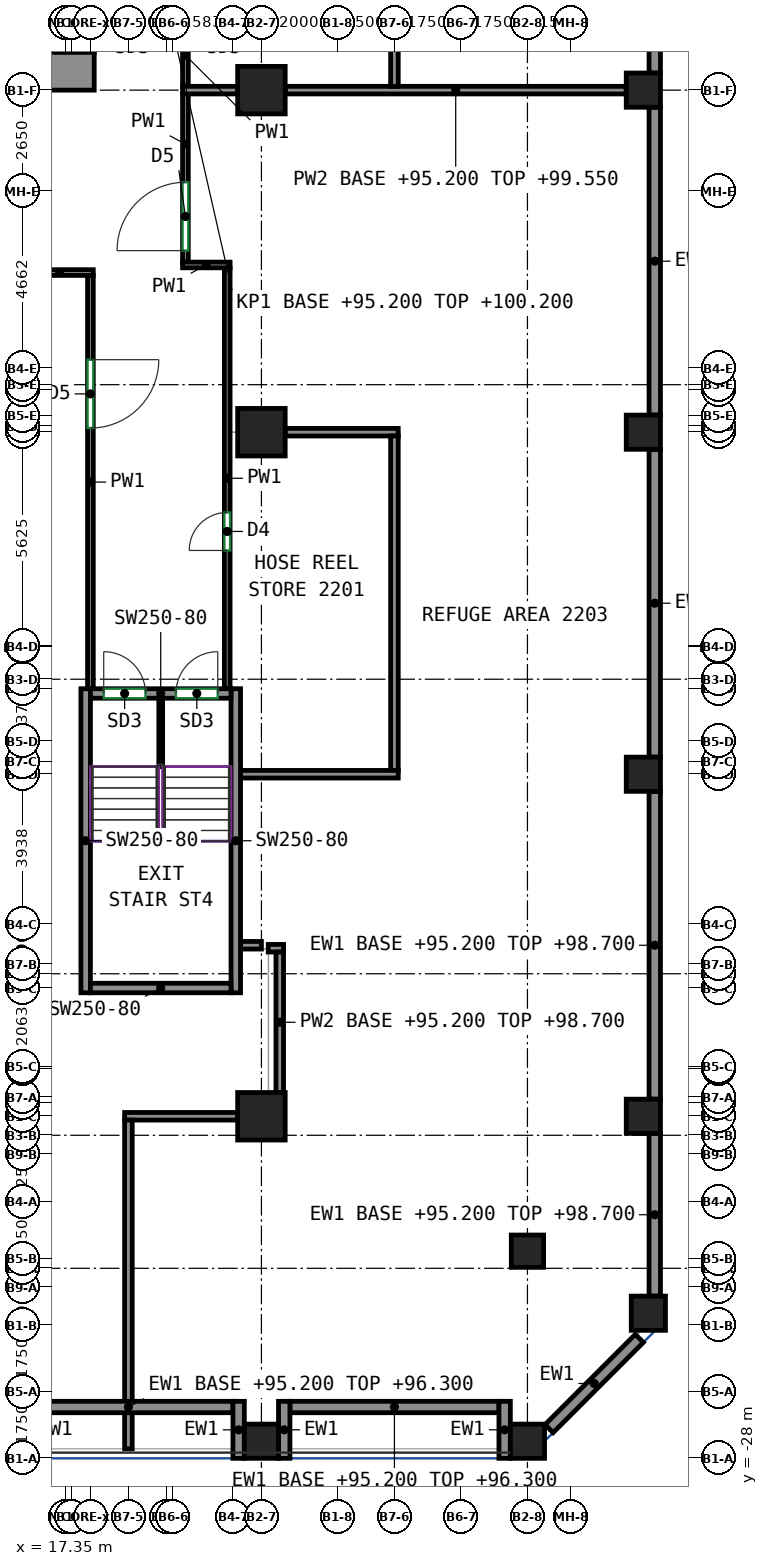
"""IFC4 building model, lengths in metres.
Left out: names, types, materials, properties, quantities, classifications, styles, units other than length and angle.
Written with IfcOpenShell. Run it as: python <this file> out.ifc"""

import sys

from ifc_helpers import new_model, si_unit, direction, frame, frame_2d, origin, origin_2d, place, context, subcontext, project, spatial, rectangle, extrude, source, transform, mapped, element, fill, save


model = new_model("IFC4")
c1 = context("Model", 3, precision=1e-05, world=origin(), true_north=direction((0.0, 1.0)))
c2 = subcontext(c1, "Body", "Model", "MODEL_VIEW")
j1 = project(units=[si_unit("LENGTHUNIT", "METRE"), si_unit("PLANEANGLEUNIT", "RADIAN")], contexts=[c1])
p1 = place(None, origin())
s1 = spatial("IfcSite", under=j1, at=p1, CompositionType="ELEMENT")
p2 = place(p1, origin())
s2 = spatial("IfcBuilding", under=s1, at=p2, CompositionType="ELEMENT")
p3 = place(p2, frame((0.0, 0.0, 95.2)))
s3 = spatial("IfcBuildingStorey", under=s2, at=p3, CompositionType="ELEMENT", Elevation=95.2)
m1 = source(origin(), c2, "Body", "SweptSolid", [
    extrude(rectangle(XDim=0.9, YDim=0.9, at=origin_2d()), origin(), (0.0, 0.0, 1.0), 3.5),
])
p4 = place(p3, frame((22.5, -27.55, 0.0), z_axis=(0.0, 0.0, 1.0), x_axis=(1.0, 0.0, 0.0)))
e1 = element("IfcColumn", 1, at=p4, inside=s3, PredefinedType="COLUMN", context=c2, shape_type="MappedRepresentation", body=[
    mapped(m1, transform((0.0, 0.0, 0.0))),
])
m2 = source(origin(), c2, "Body", "SweptSolid", [
    extrude(rectangle(XDim=1.25, YDim=1.25, at=origin_2d()), origin(), (0.0, 0.0, 1.0), 3.5),
])
for number, where, z_axis, x_axis in (
    (2, (22.5, -19.0, 0.0), (0.0, 0.0, 1.0), (1.0, 0.0, 0.0)),
    (3, (22.5, -1.0, 0.0), (0.0, 0.0, 1.0), (1.0, 0.0, 0.0)),
    (4, (22.5, 8.0, 0.0), (0.0, 0.0, 1.0), (1.0, 0.0, 0.0)),
):
    element("IfcColumn", number, at=place(p3, frame(where, z_axis=z_axis, x_axis=x_axis)), inside=s3, PredefinedType="COLUMN", context=c2, shape_type="MappedRepresentation", body=[
        mapped(m2, transform((0.0, 0.0, 0.0))),
    ])
m3 = source(origin(), c2, "Body", "SweptSolid", [
    extrude(rectangle(XDim=0.9, YDim=0.9, at=origin_2d()), origin(), (0.0, 0.0, 1.0), 5.0),
])
p5 = place(p3, frame((29.5, -27.55, 0.0), z_axis=(0.0, 0.0, 1.0), x_axis=(1.0, 0.0, 0.0)))
e5 = element("IfcColumn", 5, at=p5, inside=s3, PredefinedType="COLUMN", context=c2, shape_type="MappedRepresentation", body=[
    mapped(m3, transform((0.0, 0.0, 0.0))),
])
for number, where, z_axis, x_axis in (
    (6, (32.55, -19.0, 0.0), (0.0, 0.0, 1.0), (1.0, 0.0, 0.0)),
    (7, (32.55, -10.0, 0.0), (0.0, 0.0, 1.0), (1.0, 0.0, 0.0)),
    (8, (32.55, -1.0, 0.0), (0.0, 0.0, 1.0), (1.0, 0.0, 0.0)),
    (9, (32.55, 8.0, 0.0), (0.0, 0.0, 1.0), (1.0, 0.0, 0.0)),
    (10, (32.682, -24.182, 0.0), (0.0, 0.0, 1.0), (1.0, 0.0, 0.0)),
):
    element("IfcColumn", number, at=place(p3, frame(where, z_axis=z_axis, x_axis=x_axis)), inside=s3, PredefinedType="COLUMN", context=c2, shape_type="MappedRepresentation", body=[
        mapped(m1, transform((0.0, 0.0, 0.0))),
    ])
m4 = source(origin(), c2, "Body", "SweptSolid", [
    extrude(rectangle(XDim=0.85, YDim=0.85, at=origin_2d()), origin(), (0.0, 0.0, 1.0), 5.0),
])
p6 = place(p3, frame((29.5, -22.55, 0.0), z_axis=(0.0, 0.0, 1.0), x_axis=(1.0, 0.0, 0.0)))
e11 = element("IfcColumn", 11, at=p6, inside=s3, PredefinedType="COLUMN", context=c2, shape_type="MappedRepresentation", body=[
    mapped(m4, transform((0.0, 0.0, 0.0))),
])
m5 = source(origin(), c2, "Body", "SweptSolid", [
    extrude(rectangle(XDim=5.63, YDim=1.0, at=frame_2d((2.815, 0.0))), origin(), (0.0, 0.0, 1.0), 5.0),
])
p7 = place(p3, frame((12.47, 8.5, 0.0), z_axis=(0.0, 0.0, 1.0), x_axis=(1.0, 0.0, 0.0)))
e12 = element("IfcWall", 12, at=p7, inside=s3, PredefinedType="SHEAR", context=c2, shape_type="MappedRepresentation", body=[
    mapped(m5, transform((0.0, 0.0, 0.0))),
])
p8 = place(p7, frame((1.28, 0.0, 0.0)))
e13 = element("IfcOpeningElement", 13, at=p8, cuts=e12, PredefinedType="OPENING", context=c2, shape_type="SweptSolid", body=[
    extrude(rectangle(XDim=1.1, YDim=2.1, at=frame_2d((0.55, 1.05))), frame((0.0, 0.51, 0.0), z_axis=(0.0, -1.0, 0.0), x_axis=(1.0, 0.0, 0.0)), (0.0, 0.0, 1.0), 1.02),
])
p9 = place(p7, frame((3.18, 0.0, 0.0)))
e14 = element("IfcOpeningElement", 14, at=p9, cuts=e12, PredefinedType="OPENING", context=c2, shape_type="SweptSolid", body=[
    extrude(rectangle(XDim=1.1, YDim=2.1, at=frame_2d((0.55, 1.05))), frame((0.0, 0.51, 0.0), z_axis=(0.0, -1.0, 0.0), x_axis=(1.0, 0.0, 0.0)), (0.0, 0.0, 1.0), 1.02),
])
m6 = source(origin(), c2, "Body", "SweptSolid", [
    extrude(rectangle(XDim=8.0, YDim=0.25, at=frame_2d((4.0, 0.0))), origin(), (0.0, 0.0, 1.0), 5.0),
])
for number, where, z_axis, x_axis in (
    (15, (17.875, -15.75, 0.0), (0.0, 0.0, 1.0), (0.0, 1.0, 0.0)),
    (16, (21.825, -15.75, 0.0), (0.0, 0.0, 1.0), (0.0, 1.0, 0.0)),
):
    element("IfcWall", number, at=place(p3, frame(where, z_axis=z_axis, x_axis=x_axis)), inside=s3, PredefinedType="SHEAR", context=c2, shape_type="MappedRepresentation", body=[
        mapped(m6, transform((0.0, 0.0, 0.0))),
    ])
m7 = source(origin(), c2, "Body", "SweptSolid", [
    extrude(rectangle(XDim=3.7, YDim=0.25, at=frame_2d((1.85, 0.0))), origin(), (0.0, 0.0, 1.0), 5.0),
])
p10 = place(p3, frame((18.0, -15.625, 0.0), z_axis=(0.0, 0.0, 1.0), x_axis=(1.0, 0.0, 0.0)))
e17 = element("IfcWall", 17, at=p10, inside=s3, PredefinedType="SHEAR", context=c2, shape_type="MappedRepresentation", body=[
    mapped(m7, transform((0.0, 0.0, 0.0))),
])
p11 = place(p3, frame((18.0, -7.875, 0.0), z_axis=(0.0, 0.0, 1.0), x_axis=(1.0, 0.0, 0.0)))
e18 = element("IfcWall", 18, at=p11, inside=s3, PredefinedType="SHEAR", context=c2, shape_type="MappedRepresentation", body=[
    mapped(m7, transform((0.0, 0.0, 0.0))),
])
p12 = place(p11, frame((2.25, 0.0, 0.0)))
e19 = element("IfcOpeningElement", 19, at=p12, cuts=e18, PredefinedType="OPENING", context=c2, shape_type="SweptSolid", body=[
    extrude(rectangle(XDim=1.1, YDim=2.1, at=frame_2d((0.55, 1.05))), frame((0.0, 0.135, 0.0), z_axis=(0.0, -1.0, 0.0), x_axis=(1.0, 0.0, 0.0)), (0.0, 0.0, 1.0), 0.27),
])
p13 = place(p11, frame((0.35, 0.0, 0.0)))
e20 = element("IfcOpeningElement", 20, at=p13, cuts=e18, PredefinedType="OPENING", context=c2, shape_type="SweptSolid", body=[
    extrude(rectangle(XDim=1.1, YDim=2.1, at=frame_2d((0.55, 1.05))), frame((0.0, 0.135, 0.0), z_axis=(0.0, -1.0, 0.0), x_axis=(1.0, 0.0, 0.0)), (0.0, 0.0, 1.0), 0.27),
])
m8 = source(origin(), c2, "Body", "SweptSolid", [
    extrude(rectangle(XDim=5.5, YDim=0.3, at=frame_2d((2.75, 0.0))), origin(), (0.0, 0.0, 1.0), 1.1),
])
p14 = place(p3, frame((16.25, -26.65, 0.0), z_axis=(0.0, 0.0, 1.0), x_axis=(1.0, 0.0, 0.0)))
e21 = element("IfcWall", 21, at=p14, inside=s3, PredefinedType="SOLIDWALL", context=c2, shape_type="MappedRepresentation", body=[
    mapped(m8, transform((0.0, 0.0, 0.0))),
])
m9 = source(origin(), c2, "Body", "SweptSolid", [
    extrude(rectangle(XDim=1.5, YDim=0.3, at=frame_2d((0.75, 0.0))), origin(), (0.0, 0.0, 1.0), 5.0),
])
p15 = place(p3, frame((21.9, -28.0, 0.0), z_axis=(0.0, 0.0, 1.0), x_axis=(0.0, 1.0, 0.0)))
e22 = element("IfcWall", 22, at=p15, inside=s3, PredefinedType="SOLIDWALL", context=c2, shape_type="MappedRepresentation", body=[
    mapped(m9, transform((0.0, 0.0, 0.0))),
])
p16 = place(p3, frame((23.25, -26.65, 0.0), z_axis=(0.0, 0.0, 1.0), x_axis=(1.0, 0.0, 0.0)))
e23 = element("IfcWall", 23, at=p16, inside=s3, PredefinedType="SOLIDWALL", context=c2, shape_type="MappedRepresentation", body=[
    mapped(m8, transform((0.0, 0.0, 0.0))),
])
for number, where, z_axis, x_axis in (
    (24, (23.1, -28.0, 0.0), (0.0, 0.0, 1.0), (0.0, 1.0, 0.0)),
    (25, (28.9, -28.0, 0.0), (0.0, 0.0, 1.0), (0.0, 1.0, 0.0)),
):
    element("IfcWall", number, at=place(p3, frame(where, z_axis=z_axis, x_axis=x_axis)), inside=s3, PredefinedType="SOLIDWALL", context=c2, shape_type="MappedRepresentation", body=[
        mapped(m9, transform((0.0, 0.0, 0.0))),
    ])
m10 = source(origin(), c2, "Body", "SweptSolid", [
    extrude(rectangle(XDim=3.359, YDim=0.3, at=frame_2d((1.679, 0.0))), origin(), (0.0, 0.0, 1.0), 5.0),
])
p17 = place(p3, frame((30.069, -27.219, 0.0), z_axis=(0.0, 0.0, 1.0), x_axis=(0.707143122278, 0.707070438228, 0.0)))
e26 = element("IfcWall", 26, at=p17, inside=s3, PredefinedType="SOLIDWALL", context=c2, shape_type="MappedRepresentation", body=[
    mapped(m10, transform((0.0, 0.0, 0.0))),
])
m11 = source(origin(), c2, "Body", "SweptSolid", [
    extrude(rectangle(XDim=4.282, YDim=0.3, at=frame_2d((2.141, 0.0))), origin(), (0.0, 0.0, 1.0), 3.5),
])
p18 = place(p3, frame((32.85, -23.732, 0.0), z_axis=(0.0, 0.0, 1.0), x_axis=(0.0, 1.0, 0.0)))
e27 = element("IfcWall", 27, at=p18, inside=s3, PredefinedType="SOLIDWALL", context=c2, shape_type="MappedRepresentation", body=[
    mapped(m11, transform((0.0, 0.0, 0.0))),
])
m12 = source(origin(), c2, "Body", "SweptSolid", [
    extrude(rectangle(XDim=8.1, YDim=0.3, at=frame_2d((4.05, 0.0))), origin(), (0.0, 0.0, 1.0), 3.5),
])
for number, where, z_axis, x_axis in (
    (28, (32.85, -18.55, 0.0), (0.0, 0.0, 1.0), (0.0, 1.0, 0.0)),
    (29, (32.85, -9.55, 0.0), (0.0, 0.0, 1.0), (0.0, 1.0, 0.0)),
    (30, (32.85, -0.55, 0.0), (0.0, 0.0, 1.0), (0.0, 1.0, 0.0)),
):
    element("IfcWall", number, at=place(p3, frame(where, z_axis=z_axis, x_axis=x_axis)), inside=s3, PredefinedType="SOLIDWALL", context=c2, shape_type="MappedRepresentation", body=[
        mapped(m12, transform((0.0, 0.0, 0.0))),
    ])
m13 = source(origin(), c2, "Body", "SweptSolid", [
    extrude(rectangle(XDim=15.6, YDim=0.3, at=frame_2d((7.8, 0.0))), origin(), (0.0, 0.0, 1.0), 3.5),
])
p19 = place(p3, frame((32.85, 8.45, 0.0), z_axis=(0.0, 0.0, 1.0), x_axis=(0.0, 1.0, 0.0)))
e31 = element("IfcWall", 31, at=p19, inside=s3, PredefinedType="SOLIDWALL", context=c2, shape_type="MappedRepresentation", body=[
    mapped(m13, transform((0.0, 0.0, 0.0))),
])
m14 = source(origin(), c2, "Body", "SweptSolid", [
    extrude(rectangle(XDim=1.8, YDim=0.1, at=frame_2d((0.9, 0.0))), origin(), (0.0, 0.0, 1.0), 2.5),
])
p20 = place(p3, frame((19.85, -9.8, 0.0), z_axis=(0.0, 0.0, 1.0), x_axis=(0.0, 1.0, 0.0)))
e32 = element("IfcWall", 32, at=p20, inside=s3, PredefinedType="PARTITIONING", context=c2, shape_type="MappedRepresentation", body=[
    mapped(m14, transform((0.0, 0.0, 0.0))),
])
p21 = place(p3, frame((18.0, 3.125, 0.0), z_axis=(0.0, 0.0, 1.0), x_axis=(0.0, -1.0, 0.0)))
e33 = element("IfcWall", 33, at=p21, inside=s3, PredefinedType="PARTITIONING", context=c2, shape_type="SweptSolid", body=[
    extrude(rectangle(XDim=10.875, YDim=0.15, at=frame_2d((5.438, 0.0))), origin(), (0.0, 0.0, 1.0), 5.0),
])
p22 = place(p21, frame((2.217, 0.0, 0.0)))
e34 = element("IfcOpeningElement", 34, at=p22, cuts=e33, PredefinedType="OPENING", context=c2, shape_type="SweptSolid", body=[
    extrude(rectangle(XDim=1.8, YDim=2.1, at=frame_2d((0.9, 1.05))), frame((0.0, 0.085, 0.0), z_axis=(0.0, -1.0, 0.0), x_axis=(1.0, 0.0, 0.0)), (0.0, 0.0, 1.0), 0.17),
])
p23 = place(p3, frame((16.305, 3.2, 0.0), z_axis=(0.0, 0.0, 1.0), x_axis=(1.0, 0.0, 0.0)))
e35 = element("IfcWall", 35, at=p23, inside=s3, PredefinedType="PARTITIONING", context=c2, shape_type="SweptSolid", body=[
    extrude(rectangle(XDim=1.77, YDim=0.15, at=frame_2d((0.885, 0.0))), origin(), (0.0, 0.0, 1.0), 5.0),
])
p24 = place(p3, frame((21.6, -7.75, 0.0), z_axis=(0.0, 0.0, 1.0), x_axis=(0.0, 1.0, 0.0)))
e36 = element("IfcWall", 36, at=p24, inside=s3, PredefinedType="PARTITIONING", context=c2, shape_type="SweptSolid", body=[
    extrude(rectangle(XDim=11.075, YDim=0.15, at=frame_2d((5.538, 0.0))), origin(), (0.0, 0.0, 1.0), 5.0),
])
p25 = place(p24, frame((3.638, 0.0, 0.0)))
e37 = element("IfcOpeningElement", 37, at=p25, cuts=e36, PredefinedType="OPENING", context=c2, shape_type="SweptSolid", body=[
    extrude(rectangle(XDim=1.0, YDim=2.1, at=frame_2d((0.5, 1.05))), frame((0.0, 0.085, 0.0), z_axis=(0.0, -1.0, 0.0), x_axis=(1.0, 0.0, 0.0)), (0.0, 0.0, 1.0), 0.17),
])
p26 = place(p3, frame((20.5, 3.475, 0.0), z_axis=(0.0, 0.0, 1.0), x_axis=(0.0, 1.0, 0.0)))
e38 = element("IfcWall", 38, at=p26, inside=s3, PredefinedType="PARTITIONING", context=c2, shape_type="SweptSolid", body=[
    extrude(rectangle(XDim=4.435, YDim=0.15, at=frame_2d((2.217, 0.0))), origin(), (0.0, 0.0, 1.0), 5.0),
])
p27 = place(p26, frame((0.302, 0.0, 0.0)))
e39 = element("IfcOpeningElement", 39, at=p27, cuts=e38, PredefinedType="OPENING", context=c2, shape_type="SweptSolid", body=[
    extrude(rectangle(XDim=1.8, YDim=2.1, at=frame_2d((0.9, 1.05))), frame((0.0, 0.085, 0.0), z_axis=(0.0, -1.0, 0.0), x_axis=(1.0, 0.0, 0.0)), (0.0, 0.0, 1.0), 0.17),
])
p28 = place(p3, frame((21.675, 3.4, 0.0), z_axis=(0.0, 0.0, 1.0), x_axis=(-1.0, 0.0, 0.0)))
e40 = element("IfcWall", 40, at=p28, inside=s3, PredefinedType="PARTITIONING", context=c2, shape_type="SweptSolid", body=[
    extrude(rectangle(XDim=1.25, YDim=0.15, at=frame_2d((0.625, 0.0))), origin(), (0.0, 0.0, 1.0), 5.0),
])
p29 = place(p3, frame((20.5, 8.09, 0.0), z_axis=(0.0, 0.0, 1.0), x_axis=(0.0, 1.0, 0.0)))
e41 = element("IfcWall", 41, at=p29, inside=s3, PredefinedType="PARTITIONING", context=c2, shape_type="SweptSolid", body=[
    extrude(rectangle(XDim=1.66, YDim=0.15, at=frame_2d((0.83, 0.0))), origin(), (0.0, 0.0, 1.0), 5.0),
])
p30 = place(p3, frame((22.5, -14.5, 0.0), z_axis=(0.0, 0.0, 1.0), x_axis=(-1.0, 0.0, 0.0)))
e42 = element("IfcWall", 42, at=p30, inside=s3, PredefinedType="PARTITIONING", context=c2, shape_type="SweptSolid", body=[
    extrude(rectangle(XDim=0.55, YDim=0.2, at=frame_2d((0.275, 0.0))), origin(), (0.0, 0.0, 1.0), 5.0),
])
p31 = place(p3, frame((23.082, -14.578, 0.0), z_axis=(0.0, 0.0, 1.0), x_axis=(-1.0, 0.0, 0.0)))
e43 = element("IfcWall", 43, at=p31, inside=s3, PredefinedType="PARTITIONING", context=c2, shape_type="SweptSolid", body=[
    extrude(rectangle(XDim=0.402, YDim=0.2, at=frame_2d((0.201, 0.0))), origin(), (0.0, 0.0, 1.0), 5.0),
])
p32 = place(p3, frame((22.982, -18.375, 0.0), z_axis=(0.0, 0.0, 1.0), x_axis=(0.0, 1.0, 0.0)))
e44 = element("IfcWall", 44, at=p32, inside=s3, PredefinedType="PARTITIONING", context=c2, shape_type="SweptSolid", body=[
    extrude(rectangle(XDim=3.697, YDim=0.2, at=frame_2d((1.849, 0.0))), origin(), (0.0, 0.0, 1.0), 3.5),
])
p33 = place(p3, frame((18.9, -19.0, 0.0), z_axis=(0.0, 0.0, 1.0), x_axis=(1.0, 0.0, 0.0)))
e45 = element("IfcWall", 45, at=p33, inside=s3, PredefinedType="PARTITIONING", context=c2, shape_type="SweptSolid", body=[
    extrude(rectangle(XDim=2.975, YDim=0.2, at=frame_2d((1.488, 0.0))), origin(), (0.0, 0.0, 1.0), 5.0),
])
p34 = place(p3, frame((19.0, -27.75, 0.0), z_axis=(0.0, 0.0, 1.0), x_axis=(0.0, 1.0, 0.0)))
e46 = element("IfcWall", 46, at=p34, inside=s3, PredefinedType="PARTITIONING", context=c2, shape_type="SweptSolid", body=[
    extrude(rectangle(XDim=0.98, YDim=0.2, at=frame_2d((0.49, 0.0))), origin(), (0.0, 0.0, 1.0), 5.0),
])
p35 = place(p3, frame((19.0, -26.53, 0.0), z_axis=(0.0, 0.0, 1.0), x_axis=(0.0, 1.0, 0.0)))
e47 = element("IfcWall", 47, at=p35, inside=s3, PredefinedType="PARTITIONING", context=c2, shape_type="SweptSolid", body=[
    extrude(rectangle(XDim=7.43, YDim=0.2, at=frame_2d((3.715, 0.0))), origin(), (0.0, 0.0, 1.0), 5.0),
])
p36 = place(p3, frame((23.125, -1.0, 0.0), z_axis=(0.0, 0.0, 1.0), x_axis=(1.0, 0.0, 0.0)))
e48 = element("IfcWall", 48, at=p36, inside=s3, PredefinedType="PARTITIONING", context=c2, shape_type="SweptSolid", body=[
    extrude(rectangle(XDim=2.975, YDim=0.2, at=frame_2d((1.488, 0.0))), origin(), (0.0, 0.0, 1.0), 5.0),
])
p37 = place(p3, frame((26.0, -9.9, 0.0), z_axis=(0.0, 0.0, 1.0), x_axis=(0.0, 1.0, 0.0)))
e49 = element("IfcWall", 49, at=p37, inside=s3, PredefinedType="PARTITIONING", context=c2, shape_type="SweptSolid", body=[
    extrude(rectangle(XDim=8.8, YDim=0.2, at=frame_2d((4.4, 0.0))), origin(), (0.0, 0.0, 1.0), 5.0),
])
p38 = place(p3, frame((21.95, -10.0, 0.0), z_axis=(0.0, 0.0, 1.0), x_axis=(1.0, 0.0, 0.0)))
e50 = element("IfcWall", 50, at=p38, inside=s3, PredefinedType="PARTITIONING", context=c2, shape_type="SweptSolid", body=[
    extrude(rectangle(XDim=4.15, YDim=0.2, at=frame_2d((2.075, 0.0))), origin(), (0.0, 0.0, 1.0), 5.0),
])
p39 = place(p3, frame((20.427, 8.0, 0.0), z_axis=(0.0, 0.0, 1.0), x_axis=(1.0, 0.0, 0.0)))
e51 = element("IfcWall", 51, at=p39, inside=s3, PredefinedType="PARTITIONING", context=c2, shape_type="SweptSolid", body=[
    extrude(rectangle(XDim=1.448, YDim=0.2, at=frame_2d((0.724, 0.0))), origin(), (0.0, 0.0, 1.0), 5.0),
])
p40 = place(p3, frame((23.125, 8.0, 0.0), z_axis=(0.0, 0.0, 1.0), x_axis=(1.0, 0.0, 0.0)))
e52 = element("IfcWall", 52, at=p40, inside=s3, PredefinedType="PARTITIONING", context=c2, shape_type="SweptSolid", body=[
    extrude(rectangle(XDim=8.975, YDim=0.2, at=frame_2d((4.488, 0.0))), origin(), (0.0, 0.0, 1.0), 4.35),
])
p41 = place(p3, frame((26.0, 8.1, 0.0), z_axis=(0.0, 0.0, 1.0), x_axis=(0.0, 1.0, 0.0)))
e53 = element("IfcWall", 53, at=p41, inside=s3, PredefinedType="PARTITIONING", context=c2, shape_type="SweptSolid", body=[
    extrude(rectangle(XDim=13.8, YDim=0.2, at=frame_2d((6.9, 0.0))), origin(), (0.0, 0.0, 1.0), 5.0),
])
p42 = place(p12, origin())
e54 = element("IfcDoor", 54, at=p42, inside=s3, OperationType="SINGLE_SWING_RIGHT", PredefinedType="DOOR", context=c2, shape_type="SweptSolid", body=[
    extrude(rectangle(XDim=1.1, YDim=2.1, at=frame_2d((0.55, 1.05))), frame((0.0, 0.025, 0.0), z_axis=(0.0, -1.0, 0.0), x_axis=(1.0, 0.0, 0.0)), (0.0, 0.0, 1.0), 0.05),
])
fill(e19, e54)
p43 = place(p13, origin())
e55 = element("IfcDoor", 55, at=p43, inside=s3, OperationType="SINGLE_SWING_LEFT", PredefinedType="DOOR", context=c2, shape_type="SweptSolid", body=[
    extrude(rectangle(XDim=1.1, YDim=2.1, at=frame_2d((0.55, 1.05))), frame((0.0, 0.025, 0.0), z_axis=(0.0, -1.0, 0.0), x_axis=(1.0, 0.0, 0.0)), (0.0, 0.0, 1.0), 0.05),
])
fill(e20, e55)
p44 = place(p25, origin())
e56 = element("IfcDoor", 56, at=p44, inside=s3, OperationType="SINGLE_SWING_LEFT", PredefinedType="DOOR", context=c2, shape_type="SweptSolid", body=[
    extrude(rectangle(XDim=1.0, YDim=2.1, at=frame_2d((0.5, 1.05))), frame((0.0, 0.025, 0.0), z_axis=(0.0, -1.0, 0.0), x_axis=(1.0, 0.0, 0.0)), (0.0, 0.0, 1.0), 0.05),
])
fill(e37, e56)
p45 = place(p22, origin())
e57 = element("IfcDoor", 57, at=p45, inside=s3, OperationType="DOUBLE_DOOR_SINGLE_SWING", PredefinedType="DOOR", context=c2, shape_type="SweptSolid", body=[
    extrude(rectangle(XDim=1.8, YDim=2.1, at=frame_2d((0.9, 1.05))), frame((0.0, 0.025, 0.0), z_axis=(0.0, -1.0, 0.0), x_axis=(1.0, 0.0, 0.0)), (0.0, 0.0, 1.0), 0.05),
])
fill(e34, e57)
p46 = place(p27, origin())
e58 = element("IfcDoor", 58, at=p46, inside=s3, OperationType="DOUBLE_DOOR_SINGLE_SWING", PredefinedType="DOOR", context=c2, shape_type="SweptSolid", body=[
    extrude(rectangle(XDim=1.8, YDim=2.1, at=frame_2d((0.9, 1.05))), frame((0.0, 0.025, 0.0), z_axis=(0.0, -1.0, 0.0), x_axis=(1.0, 0.0, 0.0)), (0.0, 0.0, 1.0), 0.05),
])
fill(e39, e58)
save(model, sys.argv[1])
